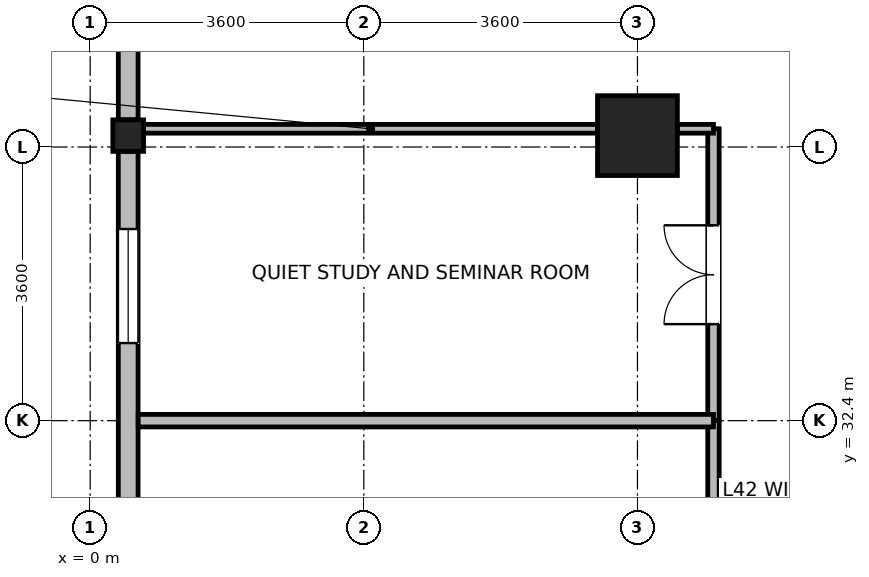
"""IFC4 building model, lengths in metres.
Left out: names, types, materials, properties, quantities, classifications, styles, units other than length and angle.
Written with IfcOpenShell. Run it as: python <this file> out.ifc"""

import sys

from ifc_helpers import new_model, si_unit, direction, frame, frame_2d, origin, origin_2d, place, context, subcontext, project, spatial, rectangle, i_section, extrude, source, transform, mapped, element, fill, save


model = new_model("IFC4")
c1 = context("Model", 3, precision=1e-05, world=origin(), true_north=direction((0.0, 1.0)))
c2 = subcontext(c1, "Body", "Model", "MODEL_VIEW")
j1 = project(units=[si_unit("LENGTHUNIT", "METRE"), si_unit("PLANEANGLEUNIT", "RADIAN")], contexts=[c1])
p1 = place(None, origin())
s1 = spatial("IfcSite", under=j1, at=p1, CompositionType="ELEMENT")
p2 = place(p1, origin())
s2 = spatial("IfcBuilding", under=s1, at=p2, CompositionType="ELEMENT")
p3 = place(p2, frame((0.0, 0.0, 166.1)))
s3 = spatial("IfcBuildingStorey", under=s2, at=p3, CompositionType="ELEMENT", Elevation=166.1)
m1 = source(origin(), c2, "Body", "SweptSolid", [
    extrude(rectangle(XDim=1.05, YDim=1.05, at=origin_2d()), origin(), (0.0, 0.0, 1.0), 3.7),
])
p4 = place(p3, frame((7.2, 36.15, 0.0), z_axis=(0.0, 0.0, 1.0), x_axis=(1.0, 0.0, 0.0)))
e1 = element("IfcColumn", 1, at=p4, inside=s3, PredefinedType="COLUMN", context=c2, shape_type="MappedRepresentation", body=[
    mapped(m1, transform((0.0, 0.0, 0.0), x_axis=(1.0, 0.0, 0.0), y_axis=(0.0, 1.0, 0.0), z_axis=(0.0, 0.0, 1.0), scale=1.0)),
])
m2 = source(origin(), c2, "Body", "SweptSolid", [
    extrude(i_section(OverallWidth=0.404, OverallDepth=0.414, WebThickness=0.021, FlangeThickness=0.028, FilletRadius=0.015, at=origin_2d()), origin(), (0.0, 0.0, 1.0), 3.7),
])
p5 = place(p3, frame((0.5, 36.15, 0.0), z_axis=(0.0, 0.0, 1.0), x_axis=(1.0, 0.0, 0.0)))
e2 = element("IfcColumn", 2, at=p5, inside=s3, PredefinedType="COLUMN", context=c2, shape_type="MappedRepresentation", body=[
    mapped(m2, transform((0.0, 0.0, 0.0), x_axis=(1.0, 0.0, 0.0), y_axis=(0.0, 1.0, 0.0), z_axis=(0.0, 0.0, 1.0), scale=1.0)),
])
p6 = place(p3, frame((0.5, 36.358, 0.0), z_axis=(0.0, 0.0, 1.0), x_axis=(0.0, 1.0, 0.0)))
e3 = element("IfcWall", 3, at=p6, inside=s3, PredefinedType="STANDARD", context=c2, shape_type="SweptSolid", body=[
    extrude(rectangle(XDim=3.372, YDim=0.26, at=frame_2d((1.686, 0.0))), origin(), (0.0, 0.0, 1.0), 3.44),
])
p7 = place(p6, frame((0.936, 0.0, 0.85)))
e4 = element("IfcOpeningElement", 4, at=p7, cuts=e3, PredefinedType="OPENING", context=c2, shape_type="SweptSolid", body=[
    extrude(rectangle(XDim=1.5, YDim=1.85, at=frame_2d((0.75, 0.925))), frame((0.0, 0.14, 0.0), z_axis=(0.0, -1.0, 0.0), x_axis=(1.0, 0.0, 0.0)), (0.0, 0.0, 1.0), 0.28),
])
p8 = place(p3, frame((0.5, 28.858, 0.0), z_axis=(0.0, 0.0, 1.0), x_axis=(0.0, 1.0, 0.0)))
e5 = element("IfcWall", 5, at=p8, inside=s3, PredefinedType="STANDARD", context=c2, shape_type="SweptSolid", body=[
    extrude(rectangle(XDim=7.084, YDim=0.26, at=frame_2d((3.542, 0.0))), origin(), (0.0, 0.0, 1.0), 2.99),
])
p9 = place(p8, frame((1.021, 0.0, 0.85)))
e6 = element("IfcOpeningElement", 6, at=p9, cuts=e5, PredefinedType="OPENING", context=c2, shape_type="SweptSolid", body=[
    extrude(rectangle(XDim=1.5, YDim=1.85, at=frame_2d((0.75, 0.925))), frame((0.0, 0.14, 0.0), z_axis=(0.0, -1.0, 0.0), x_axis=(1.0, 0.0, 0.0)), (0.0, 0.0, 1.0), 0.28),
])
p10 = place(p8, frame((4.563, 0.0, 0.85)))
e7 = element("IfcOpeningElement", 7, at=p10, cuts=e5, PredefinedType="OPENING", context=c2, shape_type="SweptSolid", body=[
    extrude(rectangle(XDim=1.5, YDim=1.85, at=frame_2d((0.75, 0.925))), frame((0.0, 0.14, 0.0), z_axis=(0.0, -1.0, 0.0), x_axis=(1.0, 0.0, 0.0)), (0.0, 0.0, 1.0), 0.28),
])
p11 = place(p3, frame((8.2, 32.4, 0.0), z_axis=(0.0, 0.0, 1.0), x_axis=(0.0, 1.0, 0.0)))
e8 = element("IfcWall", 8, at=p11, inside=s3, PredefinedType="PARTITIONING", context=c2, shape_type="SweptSolid", body=[
    extrude(rectangle(XDim=3.84, YDim=0.15, at=frame_2d((1.92, 0.0))), origin(), (0.0, 0.0, 1.0), 3.44),
])
p12 = place(p11, frame((1.27, 0.0, 0.0)))
e9 = element("IfcOpeningElement", 9, at=p12, cuts=e8, PredefinedType="OPENING", context=c2, shape_type="SweptSolid", body=[
    extrude(rectangle(XDim=1.3, YDim=2.12, at=frame_2d((0.65, 1.06))), frame((0.0, 0.085, 0.0), z_axis=(0.0, -1.0, 0.0), x_axis=(1.0, 0.0, 0.0)), (0.0, 0.0, 1.0), 0.17),
])
p13 = place(p3, frame((8.2, 28.56, 0.0), z_axis=(0.0, 0.0, 1.0), x_axis=(0.0, 1.0, 0.0)))
e10 = element("IfcWall", 10, at=p13, inside=s3, PredefinedType="PARTITIONING", context=c2, shape_type="SweptSolid", body=[
    extrude(rectangle(XDim=3.84, YDim=0.15, at=frame_2d((1.92, 0.0))), origin(), (0.0, 0.0, 1.0), 3.44),
])
p14 = place(p3, frame((0.632, 32.4, 0.0), z_axis=(0.0, 0.0, 1.0), x_axis=(1.0, 0.0, 0.0)))
e11 = element("IfcWall", 11, at=p14, inside=s3, PredefinedType="PARTITIONING", context=c2, shape_type="SweptSolid", body=[
    extrude(rectangle(XDim=7.568, YDim=0.165, at=frame_2d((3.784, 0.0))), origin(), (0.0, 0.0, 1.0), 3.44),
])
p15 = place(p3, frame((0.702, 36.24, 0.0), z_axis=(0.0, 0.0, 1.0), x_axis=(1.0, 0.0, 0.0)))
e12 = element("IfcWall", 12, at=p15, inside=s3, PredefinedType="PARTITIONING", context=c2, shape_type="SweptSolid", body=[
    extrude(rectangle(XDim=5.973, YDim=0.115, at=frame_2d((2.987, 0.0))), origin(), (0.0, 0.0, 1.0), 2.84),
])
p16 = place(p3, frame((7.725, 36.24, 0.0), z_axis=(0.0, 0.0, 1.0), x_axis=(1.0, 0.0, 0.0)))
e13 = element("IfcWall", 13, at=p16, inside=s3, PredefinedType="PARTITIONING", context=c2, shape_type="SweptSolid", body=[
    extrude(rectangle(XDim=0.475, YDim=0.115, at=frame_2d((0.237, 0.0))), origin(), (0.0, 0.0, 1.0), 2.84),
])
p17 = place(p10, origin())
e14 = element("IfcWindow", 14, at=p17, inside=s3, PartitioningType="SINGLE_PANEL", PredefinedType="WINDOW", context=c2, shape_type="SweptSolid", body=[
    extrude(rectangle(XDim=1.5, YDim=1.85, at=frame_2d((0.75, 0.925))), frame((0.0, 0.03, 0.0), z_axis=(0.0, -1.0, 0.0), x_axis=(1.0, 0.0, 0.0)), (0.0, 0.0, 1.0), 0.06),
])
fill(e7, e14)
p18 = place(p12, origin())
e15 = element("IfcDoor", 15, at=p18, inside=s3, OperationType="DOUBLE_DOOR_SINGLE_SWING", PredefinedType="DOOR", context=c2, shape_type="SweptSolid", body=[
    extrude(rectangle(XDim=1.3, YDim=2.12, at=frame_2d((0.65, 1.06))), frame((0.0, 0.025, 0.0), z_axis=(0.0, -1.0, 0.0), x_axis=(1.0, 0.0, 0.0)), (0.0, 0.0, 1.0), 0.05),
])
fill(e9, e15)
save(model, sys.argv[1])
